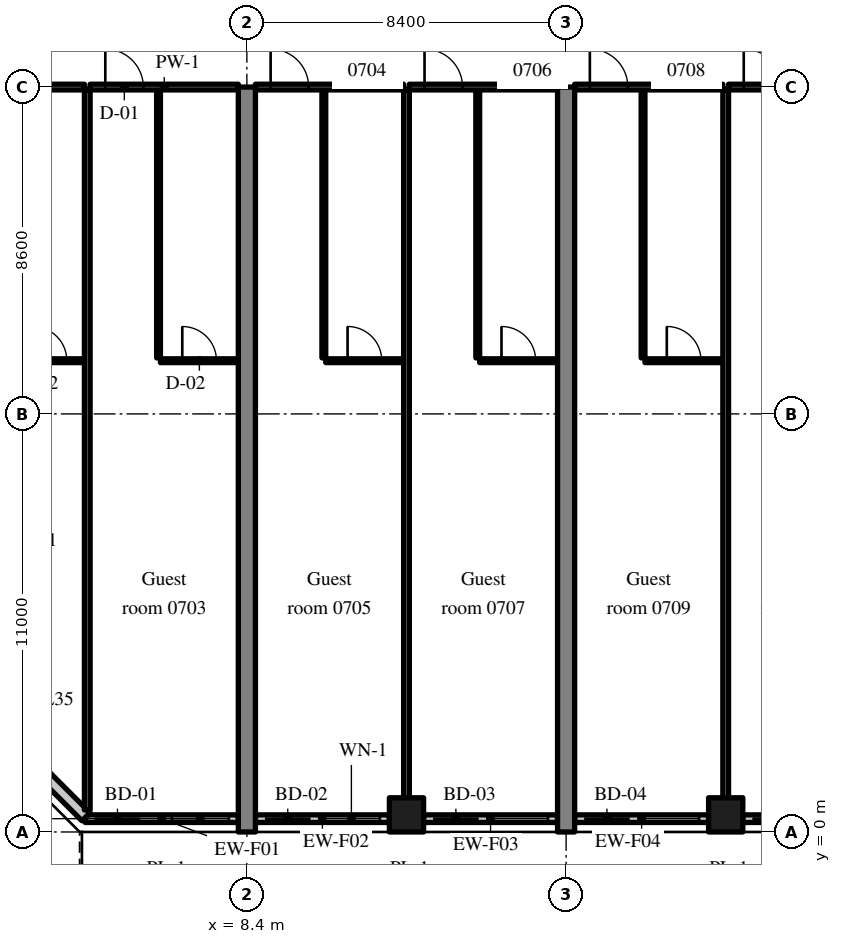
"""IFC4 building model, lengths in metres.
Left out: names, types, materials, properties, quantities, classifications, styles, units other than length and angle.
Written with IfcOpenShell. Run it as: python <this file> out.ifc"""

import sys

from ifc_helpers import new_model, si_unit, direction, frame, frame_2d, origin, origin_2d, place, context, subcontext, project, spatial, rectangle, extrude, source, transform, mapped, element, fill, save


model = new_model("IFC4")
c1 = context("Model", 3, precision=1e-05, world=origin(), true_north=direction((0.0, 1.0)))
c2 = subcontext(c1, "Body", "Model", "MODEL_VIEW")
j1 = project(units=[si_unit("LENGTHUNIT", "METRE"), si_unit("PLANEANGLEUNIT", "RADIAN")], contexts=[c1])
p1 = place(None, origin())
s1 = spatial("IfcSite", under=j1, at=p1, CompositionType="ELEMENT")
p2 = place(p1, origin())
s2 = spatial("IfcBuilding", under=s1, at=p2, CompositionType="ELEMENT")
p3 = place(p2, frame((0.0, 0.0, 35.4)))
s3 = spatial("IfcBuildingStorey", under=s2, at=p3, CompositionType="ELEMENT", Elevation=35.4)
m1 = source(origin(), c2, "Body", "SweptSolid", [
    extrude(rectangle(XDim=19.6, YDim=0.45, at=frame_2d((9.8, 0.0))), origin(), (0.0, 0.0, 1.0), 3.52),
])
for number, where, z_axis, x_axis in (
    (1, (8.4, 0.0, 0.0), (0.0, 0.0, 1.0), (0.0, 1.0, 0.0)),
    (2, (16.8, 0.0, 0.0), (0.0, 0.0, 1.0), (0.0, 1.0, 0.0)),
):
    element("IfcWall", number, at=place(p3, frame(where, z_axis=z_axis, x_axis=x_axis)), inside=s3, PredefinedType="SHEAR", context=c2, shape_type="MappedRepresentation", body=[
        mapped(m1, transform((0.0, 0.0, 0.0), scale=1.0)),
    ])
m2 = source(origin(), c2, "Body", "SweptSolid", [
    extrude(rectangle(XDim=0.9, YDim=0.9, at=origin_2d()), origin(), (0.0, 0.0, 1.0), 3.52),
])
for number, where, z_axis, x_axis in (
    (3, (12.6, 0.45, 0.0), (0.0, 0.0, 1.0), (1.0, 0.0, 0.0)),
    (4, (21.0, 0.45, 0.0), (0.0, 0.0, 1.0), (1.0, 0.0, 0.0)),
):
    element("IfcColumn", number, at=place(p3, frame(where, z_axis=z_axis, x_axis=x_axis)), inside=s3, PredefinedType="COLUMN", context=c2, shape_type="MappedRepresentation", body=[
        mapped(m2, transform((0.0, 0.0, 0.0), scale=1.0)),
    ])
m3 = source(origin(), c2, "Body", "SweptSolid", [
    extrude(rectangle(XDim=4.03, YDim=0.2, at=frame_2d((2.015, 0.0))), origin(), (0.0, 0.0, 1.0), 2.77),
])
p4 = place(p3, frame((4.145, 0.35, 0.0), z_axis=(0.0, 0.0, 1.0), x_axis=(1.0, 0.0, 0.0)))
e5 = element("IfcWall", 5, at=p4, inside=s3, PredefinedType="SOLIDWALL", context=c2, shape_type="MappedRepresentation", body=[
    mapped(m3, transform((0.0, 0.0, 0.0), scale=1.0)),
])
m4 = source(origin(), c2, "Body", "SweptSolid", [
    extrude(rectangle(XDim=1.2, YDim=2.4, at=frame_2d((0.6, 1.2))), frame((0.0, 0.11, 0.0), z_axis=(0.0, -1.0, 0.0), x_axis=(1.0, 0.0, 0.0)), (0.0, 0.0, 1.0), 0.22),
])
p5 = place(p4, frame((0.25, 0.0, 0.0)))
e6 = element("IfcOpeningElement", 6, at=p5, cuts=e5, PredefinedType="OPENING", context=c2, shape_type="MappedRepresentation", body=[
    mapped(m4, transform((0.0, 0.0, 0.0), scale=1.0)),
])
m5 = source(origin(), c2, "Body", "SweptSolid", [
    extrude(rectangle(XDim=1.5, YDim=1.5, at=frame_2d((0.75, 0.75))), frame((0.0, 0.11, 0.0), z_axis=(0.0, -1.0, 0.0), x_axis=(1.0, 0.0, 0.0)), (0.0, 0.0, 1.0), 0.22),
])
p6 = place(p4, frame((2.28, 0.0, 0.9)))
e7 = element("IfcOpeningElement", 7, at=p6, cuts=e5, PredefinedType="OPENING", context=c2, shape_type="MappedRepresentation", body=[
    mapped(m5, transform((0.0, 0.0, 0.0), scale=1.0)),
])
m6 = source(origin(), c2, "Body", "SweptSolid", [
    extrude(rectangle(XDim=3.525, YDim=0.2, at=frame_2d((1.762, 0.0))), origin(), (0.0, 0.0, 1.0), 2.77),
])
p7 = place(p3, frame((8.625, 0.35, 0.0), z_axis=(0.0, 0.0, 1.0), x_axis=(1.0, 0.0, 0.0)))
e8 = element("IfcWall", 8, at=p7, inside=s3, PredefinedType="SOLIDWALL", context=c2, shape_type="MappedRepresentation", body=[
    mapped(m6, transform((0.0, 0.0, 0.0), scale=1.0)),
])
p8 = place(p7, frame((0.25, 0.0, 0.0)))
e9 = element("IfcOpeningElement", 9, at=p8, cuts=e8, PredefinedType="OPENING", context=c2, shape_type="MappedRepresentation", body=[
    mapped(m4, transform((0.0, 0.0, 0.0), scale=1.0)),
])
p9 = place(p7, frame((1.775, 0.0, 0.9)))
e10 = element("IfcOpeningElement", 10, at=p9, cuts=e8, PredefinedType="OPENING", context=c2, shape_type="MappedRepresentation", body=[
    mapped(m5, transform((0.0, 0.0, 0.0), scale=1.0)),
])
p10 = place(p3, frame((13.05, 0.35, 0.0), z_axis=(0.0, 0.0, 1.0), x_axis=(1.0, 0.0, 0.0)))
e11 = element("IfcWall", 11, at=p10, inside=s3, PredefinedType="SOLIDWALL", context=c2, shape_type="MappedRepresentation", body=[
    mapped(m6, transform((0.0, 0.0, 0.0), scale=1.0)),
])
p11 = place(p10, frame((0.25, 0.0, 0.0)))
e12 = element("IfcOpeningElement", 12, at=p11, cuts=e11, PredefinedType="OPENING", context=c2, shape_type="MappedRepresentation", body=[
    mapped(m4, transform((0.0, 0.0, 0.0), scale=1.0)),
])
p12 = place(p10, frame((1.775, 0.0, 0.9)))
e13 = element("IfcOpeningElement", 13, at=p12, cuts=e11, PredefinedType="OPENING", context=c2, shape_type="MappedRepresentation", body=[
    mapped(m5, transform((0.0, 0.0, 0.0), scale=1.0)),
])
m7 = source(origin(), c2, "Body", "SweptSolid", [
    extrude(rectangle(XDim=3.525, YDim=0.2, at=frame_2d((1.763, 0.0))), origin(), (0.0, 0.0, 1.0), 2.77),
])
p13 = place(p3, frame((17.025, 0.35, 0.0), z_axis=(0.0, 0.0, 1.0), x_axis=(1.0, 0.0, 0.0)))
e14 = element("IfcWall", 14, at=p13, inside=s3, PredefinedType="SOLIDWALL", context=c2, shape_type="MappedRepresentation", body=[
    mapped(m7, transform((0.0, 0.0, 0.0), scale=1.0)),
])
p14 = place(p13, frame((0.25, 0.0, 0.0)))
e15 = element("IfcOpeningElement", 15, at=p14, cuts=e14, PredefinedType="OPENING", context=c2, shape_type="MappedRepresentation", body=[
    mapped(m4, transform((0.0, 0.0, 0.0), scale=1.0)),
])
p15 = place(p13, frame((1.775, 0.0, 0.9)))
e16 = element("IfcOpeningElement", 16, at=p15, cuts=e14, PredefinedType="OPENING", context=c2, shape_type="MappedRepresentation", body=[
    mapped(m5, transform((0.0, 0.0, 0.0), scale=1.0)),
])
p16 = place(p3, frame((21.45, 0.35, 0.0), z_axis=(0.0, 0.0, 1.0), x_axis=(1.0, 0.0, 0.0)))
e17 = element("IfcWall", 17, at=p16, inside=s3, PredefinedType="SOLIDWALL", context=c2, shape_type="MappedRepresentation", body=[
    mapped(m7, transform((0.0, 0.0, 0.0), scale=1.0)),
])
p17 = place(p16, frame((0.25, 0.0, 0.0)))
e18 = element("IfcOpeningElement", 18, at=p17, cuts=e17, PredefinedType="OPENING", context=c2, shape_type="MappedRepresentation", body=[
    mapped(m4, transform((0.0, 0.0, 0.0), scale=1.0)),
])
p18 = place(p16, frame((1.775, 0.0, 0.9)))
e19 = element("IfcOpeningElement", 19, at=p18, cuts=e17, PredefinedType="OPENING", context=c2, shape_type="MappedRepresentation", body=[
    mapped(m5, transform((0.0, 0.0, 0.0), scale=1.0)),
])
m8 = source(origin(), c2, "Body", "SweptSolid", [
    extrude(rectangle(XDim=5.326, YDim=0.3, at=frame_2d((2.663, 0.0))), origin(), (0.0, 0.0, 1.0), 3.52),
])
p19 = place(p3, frame((0.4, 4.166, 0.0), z_axis=(0.0, 0.0, 1.0), x_axis=(0.707106781187, -0.707106781187, 0.0)))
e20 = element("IfcWall", 20, at=p19, inside=s3, PredefinedType="SOLIDWALL", context=c2, shape_type="MappedRepresentation", body=[
    mapped(m8, transform((0.0, 0.0, 0.0), scale=1.0)),
])
m9 = source(origin(), c2, "Body", "SweptSolid", [
    extrude(rectangle(XDim=1.8, YDim=1.5, at=frame_2d((0.9, 0.75))), frame((0.0, 0.16, 0.0), z_axis=(0.0, -1.0, 0.0), x_axis=(1.0, 0.0, 0.0)), (0.0, 0.0, 1.0), 0.32),
])
p20 = place(p19, frame((1.889, 0.0, 0.9)))
e21 = element("IfcOpeningElement", 21, at=p20, cuts=e20, PredefinedType="OPENING", context=c2, shape_type="MappedRepresentation", body=[
    mapped(m9, transform((0.0, 0.0, 0.0), scale=1.0)),
])
m10 = source(origin(), c2, "Body", "SweptSolid", [
    extrude(rectangle(XDim=1.825, YDim=0.1, at=frame_2d((0.913, 0.0))), origin(), (0.0, 0.0, 1.0), 3.52),
])
p21 = place(p3, frame((2.3, 12.4, 0.0), z_axis=(0.0, 0.0, 1.0), x_axis=(1.0, 0.0, 0.0)))
e22 = element("IfcWall", 22, at=p21, inside=s3, PredefinedType="PARTITIONING", context=c2, shape_type="MappedRepresentation", body=[
    mapped(m10, transform((0.0, 0.0, 0.0), scale=1.0)),
])
m11 = source(origin(), c2, "Body", "SweptSolid", [
    extrude(rectangle(XDim=0.9, YDim=2.1, at=frame_2d((0.45, 1.05))), frame((0.0, 0.06, 0.0), z_axis=(0.0, -1.0, 0.0), x_axis=(1.0, 0.0, 0.0)), (0.0, 0.0, 1.0), 0.12),
])
p22 = place(p21, frame((0.462, 0.0, 0.0)))
e23 = element("IfcOpeningElement", 23, at=p22, cuts=e22, PredefinedType="OPENING", context=c2, shape_type="MappedRepresentation", body=[
    mapped(m11, transform((0.0, 0.0, 0.0), scale=1.0)),
])
m12 = source(origin(), c2, "Body", "SweptSolid", [
    extrude(rectangle(XDim=3.675, YDim=0.15, at=frame_2d((1.837, 0.0))), origin(), (0.0, 0.0, 1.0), 2.82),
])
p23 = place(p3, frame((0.45, 19.6, 0.0), z_axis=(0.0, 0.0, 1.0), x_axis=(1.0, 0.0, 0.0)))
e24 = element("IfcWall", 24, at=p23, inside=s3, PredefinedType="PARTITIONING", context=c2, shape_type="MappedRepresentation", body=[
    mapped(m12, transform((0.0, 0.0, 0.0), scale=1.0)),
])
m13 = source(origin(), c2, "Body", "SweptSolid", [
    extrude(rectangle(XDim=1.0, YDim=2.1, at=frame_2d((0.5, 1.05))), frame((0.0, 0.085, 0.0), z_axis=(0.0, -1.0, 0.0), x_axis=(1.0, 0.0, 0.0)), (0.0, 0.0, 1.0), 0.17),
])
p24 = place(p23, frame((0.4, 0.0, 0.0)))
e25 = element("IfcOpeningElement", 25, at=p24, cuts=e24, PredefinedType="OPENING", context=c2, shape_type="MappedRepresentation", body=[
    mapped(m13, transform((0.0, 0.0, 0.0), scale=1.0)),
])
m14 = source(origin(), c2, "Body", "SweptSolid", [
    extrude(rectangle(XDim=7.05, YDim=0.1, at=frame_2d((3.525, 0.0))), origin(), (0.0, 0.0, 1.0), 3.52),
])
p25 = place(p3, frame((6.075, 12.475, 0.0), z_axis=(0.0, 0.0, 1.0), x_axis=(0.0, 1.0, 0.0)))
e26 = element("IfcWall", 26, at=p25, inside=s3, PredefinedType="PARTITIONING", context=c2, shape_type="MappedRepresentation", body=[
    mapped(m14, transform((0.0, 0.0, 0.0), scale=1.0)),
])
m15 = source(origin(), c2, "Body", "SweptSolid", [
    extrude(rectangle(XDim=2.05, YDim=0.1, at=frame_2d((1.025, 0.0))), origin(), (0.0, 0.0, 1.0), 3.52),
])
p26 = place(p3, frame((6.125, 12.4, 0.0), z_axis=(0.0, 0.0, 1.0), x_axis=(1.0, 0.0, 0.0)))
e27 = element("IfcWall", 27, at=p26, inside=s3, PredefinedType="PARTITIONING", context=c2, shape_type="MappedRepresentation", body=[
    mapped(m15, transform((0.0, 0.0, 0.0), scale=1.0)),
])
p27 = place(p26, frame((0.575, 0.0, 0.0)))
e28 = element("IfcOpeningElement", 28, at=p27, cuts=e27, PredefinedType="OPENING", context=c2, shape_type="MappedRepresentation", body=[
    mapped(m11, transform((0.0, 0.0, 0.0), scale=1.0)),
])
m16 = source(origin(), c2, "Body", "SweptSolid", [
    extrude(rectangle(XDim=3.9, YDim=0.15, at=frame_2d((1.95, 0.0))), origin(), (0.0, 0.0, 1.0), 2.82),
])
p28 = place(p3, frame((4.275, 19.6, 0.0), z_axis=(0.0, 0.0, 1.0), x_axis=(1.0, 0.0, 0.0)))
e29 = element("IfcWall", 29, at=p28, inside=s3, PredefinedType="PARTITIONING", context=c2, shape_type="MappedRepresentation", body=[
    mapped(m16, transform((0.0, 0.0, 0.0), scale=1.0)),
])
p29 = place(p28, frame((0.4, 0.0, 0.0)))
e30 = element("IfcOpeningElement", 30, at=p29, cuts=e29, PredefinedType="OPENING", context=c2, shape_type="MappedRepresentation", body=[
    mapped(m13, transform((0.0, 0.0, 0.0), scale=1.0)),
])
m17 = source(origin(), c2, "Body", "SweptSolid", [
    extrude(rectangle(XDim=18.947, YDim=0.15, at=frame_2d((9.474, 0.0))), origin(), (0.0, 0.0, 1.0), 3.52),
])
p30 = place(p3, frame((4.2, 0.578, 0.0), z_axis=(0.0, 0.0, 1.0), x_axis=(0.0, 1.0, 0.0)))
e31 = element("IfcWall", 31, at=p30, inside=s3, PredefinedType="PARTITIONING", context=c2, shape_type="MappedRepresentation", body=[
    mapped(m17, transform((0.0, 0.0, 0.0), scale=1.0)),
])
p31 = place(p3, frame((10.425, 12.475, 0.0), z_axis=(0.0, 0.0, 1.0), x_axis=(0.0, 1.0, 0.0)))
e32 = element("IfcWall", 32, at=p31, inside=s3, PredefinedType="PARTITIONING", context=c2, shape_type="MappedRepresentation", body=[
    mapped(m14, transform((0.0, 0.0, 0.0), scale=1.0)),
])
m18 = source(origin(), c2, "Body", "SweptSolid", [
    extrude(rectangle(XDim=2.05, YDim=0.1, at=frame_2d((1.025, 0.0))), origin(), (0.0, 0.0, 1.0), 3.52),
])
p32 = place(p3, frame((10.475, 12.4, 0.0), z_axis=(0.0, 0.0, 1.0), x_axis=(1.0, 0.0, 0.0)))
e33 = element("IfcWall", 33, at=p32, inside=s3, PredefinedType="PARTITIONING", context=c2, shape_type="MappedRepresentation", body=[
    mapped(m18, transform((0.0, 0.0, 0.0), scale=1.0)),
])
p33 = place(p32, frame((0.575, 0.0, 0.0)))
e34 = element("IfcOpeningElement", 34, at=p33, cuts=e33, PredefinedType="OPENING", context=c2, shape_type="MappedRepresentation", body=[
    mapped(m11, transform((0.0, 0.0, 0.0), scale=1.0)),
])
m19 = source(origin(), c2, "Body", "SweptSolid", [
    extrude(rectangle(XDim=3.9, YDim=0.15, at=frame_2d((1.95, 0.0))), origin(), (0.0, 0.0, 1.0), 2.82),
])
p34 = place(p3, frame((8.625, 19.6, 0.0), z_axis=(0.0, 0.0, 1.0), x_axis=(1.0, 0.0, 0.0)))
e35 = element("IfcWall", 35, at=p34, inside=s3, PredefinedType="PARTITIONING", context=c2, shape_type="MappedRepresentation", body=[
    mapped(m19, transform((0.0, 0.0, 0.0), scale=1.0)),
])
p35 = place(p34, frame((0.4, 0.0, 0.0)))
e36 = element("IfcOpeningElement", 36, at=p35, cuts=e35, PredefinedType="OPENING", context=c2, shape_type="MappedRepresentation", body=[
    mapped(m13, transform((0.0, 0.0, 0.0), scale=1.0)),
])
p36 = place(p3, frame((14.475, 12.475, 0.0), z_axis=(0.0, 0.0, 1.0), x_axis=(0.0, 1.0, 0.0)))
e37 = element("IfcWall", 37, at=p36, inside=s3, PredefinedType="PARTITIONING", context=c2, shape_type="MappedRepresentation", body=[
    mapped(m14, transform((0.0, 0.0, 0.0), scale=1.0)),
])
p37 = place(p3, frame((14.525, 12.4, 0.0), z_axis=(0.0, 0.0, 1.0), x_axis=(1.0, 0.0, 0.0)))
e38 = element("IfcWall", 38, at=p37, inside=s3, PredefinedType="PARTITIONING", context=c2, shape_type="MappedRepresentation", body=[
    mapped(m15, transform((0.0, 0.0, 0.0), scale=1.0)),
])
p38 = place(p37, frame((0.575, 0.0, 0.0)))
e39 = element("IfcOpeningElement", 39, at=p38, cuts=e38, PredefinedType="OPENING", context=c2, shape_type="MappedRepresentation", body=[
    mapped(m11, transform((0.0, 0.0, 0.0), scale=1.0)),
])
p39 = place(p3, frame((12.675, 19.6, 0.0), z_axis=(0.0, 0.0, 1.0), x_axis=(1.0, 0.0, 0.0)))
e40 = element("IfcWall", 40, at=p39, inside=s3, PredefinedType="PARTITIONING", context=c2, shape_type="MappedRepresentation", body=[
    mapped(m19, transform((0.0, 0.0, 0.0), scale=1.0)),
])
p40 = place(p39, frame((0.4, 0.0, 0.0)))
e41 = element("IfcOpeningElement", 41, at=p40, cuts=e40, PredefinedType="OPENING", context=c2, shape_type="MappedRepresentation", body=[
    mapped(m13, transform((0.0, 0.0, 0.0), scale=1.0)),
])
m20 = source(origin(), c2, "Body", "SweptSolid", [
    extrude(rectangle(XDim=18.625, YDim=0.15, at=frame_2d((9.312, 0.0))), origin(), (0.0, 0.0, 1.0), 3.52),
])
p41 = place(p3, frame((12.6, 0.9, 0.0), z_axis=(0.0, 0.0, 1.0), x_axis=(0.0, 1.0, 0.0)))
e42 = element("IfcWall", 42, at=p41, inside=s3, PredefinedType="PARTITIONING", context=c2, shape_type="MappedRepresentation", body=[
    mapped(m20, transform((0.0, 0.0, 0.0), scale=1.0)),
])
p42 = place(p3, frame((18.825, 12.475, 0.0), z_axis=(0.0, 0.0, 1.0), x_axis=(0.0, 1.0, 0.0)))
e43 = element("IfcWall", 43, at=p42, inside=s3, PredefinedType="PARTITIONING", context=c2, shape_type="MappedRepresentation", body=[
    mapped(m14, transform((0.0, 0.0, 0.0), scale=1.0)),
])
p43 = place(p3, frame((18.875, 12.4, 0.0), z_axis=(0.0, 0.0, 1.0), x_axis=(1.0, 0.0, 0.0)))
e44 = element("IfcWall", 44, at=p43, inside=s3, PredefinedType="PARTITIONING", context=c2, shape_type="MappedRepresentation", body=[
    mapped(m15, transform((0.0, 0.0, 0.0), scale=1.0)),
])
p44 = place(p43, frame((0.575, 0.0, 0.0)))
e45 = element("IfcOpeningElement", 45, at=p44, cuts=e44, PredefinedType="OPENING", context=c2, shape_type="MappedRepresentation", body=[
    mapped(m11, transform((0.0, 0.0, 0.0), scale=1.0)),
])
p45 = place(p3, frame((17.025, 19.6, 0.0), z_axis=(0.0, 0.0, 1.0), x_axis=(1.0, 0.0, 0.0)))
e46 = element("IfcWall", 46, at=p45, inside=s3, PredefinedType="PARTITIONING", context=c2, shape_type="MappedRepresentation", body=[
    mapped(m16, transform((0.0, 0.0, 0.0), scale=1.0)),
])
p46 = place(p45, frame((0.4, 0.0, 0.0)))
e47 = element("IfcOpeningElement", 47, at=p46, cuts=e46, PredefinedType="OPENING", context=c2, shape_type="MappedRepresentation", body=[
    mapped(m13, transform((0.0, 0.0, 0.0), scale=1.0)),
])
p47 = place(p3, frame((21.075, 19.6, 0.0), z_axis=(0.0, 0.0, 1.0), x_axis=(1.0, 0.0, 0.0)))
e48 = element("IfcWall", 48, at=p47, inside=s3, PredefinedType="PARTITIONING", context=c2, shape_type="MappedRepresentation", body=[
    mapped(m16, transform((0.0, 0.0, 0.0), scale=1.0)),
])
p48 = place(p47, frame((0.4, 0.0, 0.0)))
e49 = element("IfcOpeningElement", 49, at=p48, cuts=e48, PredefinedType="OPENING", context=c2, shape_type="MappedRepresentation", body=[
    mapped(m13, transform((0.0, 0.0, 0.0), scale=1.0)),
])
p49 = place(p3, frame((21.0, 0.9, 0.0), z_axis=(0.0, 0.0, 1.0), x_axis=(0.0, 1.0, 0.0)))
e50 = element("IfcWall", 50, at=p49, inside=s3, PredefinedType="PARTITIONING", context=c2, shape_type="MappedRepresentation", body=[
    mapped(m20, transform((0.0, 0.0, 0.0), scale=1.0)),
])
m21 = source(origin(), c2, "Body", "SweptSolid", [
    extrude(rectangle(XDim=1.2, YDim=2.4, at=frame_2d((0.6, 1.2))), frame((0.0, 0.025, 0.0), z_axis=(0.0, -1.0, 0.0), x_axis=(1.0, 0.0, 0.0)), (0.0, 0.0, 1.0), 0.05),
])
p50 = place(p5, origin())
e51 = element("IfcDoor", 51, at=p50, inside=s3, OperationType="SLIDING_TO_LEFT", PredefinedType="DOOR", context=c2, shape_type="MappedRepresentation", body=[
    mapped(m21, transform((0.0, 0.0, 0.0), scale=1.0)),
])
fill(e6, e51)
m22 = source(origin(), c2, "Body", "SweptSolid", [
    extrude(rectangle(XDim=1.5, YDim=1.5, at=frame_2d((0.75, 0.75))), frame((0.0, 0.03, 0.0), z_axis=(0.0, -1.0, 0.0), x_axis=(1.0, 0.0, 0.0)), (0.0, 0.0, 1.0), 0.06),
])
p51 = place(p6, origin())
e52 = element("IfcWindow", 52, at=p51, inside=s3, PartitioningType="SINGLE_PANEL", PredefinedType="WINDOW", context=c2, shape_type="MappedRepresentation", body=[
    mapped(m22, transform((0.0, 0.0, 0.0), scale=1.0)),
])
fill(e7, e52)
p52 = place(p8, origin())
e53 = element("IfcDoor", 53, at=p52, inside=s3, OperationType="SLIDING_TO_RIGHT", PredefinedType="DOOR", context=c2, shape_type="MappedRepresentation", body=[
    mapped(m21, transform((0.0, 0.0, 0.0), scale=1.0)),
])
fill(e9, e53)
p53 = place(p9, origin())
e54 = element("IfcWindow", 54, at=p53, inside=s3, PartitioningType="SINGLE_PANEL", PredefinedType="WINDOW", context=c2, shape_type="MappedRepresentation", body=[
    mapped(m22, transform((0.0, 0.0, 0.0), scale=1.0)),
])
fill(e10, e54)
p54 = place(p11, origin())
e55 = element("IfcDoor", 55, at=p54, inside=s3, OperationType="SLIDING_TO_LEFT", PredefinedType="DOOR", context=c2, shape_type="MappedRepresentation", body=[
    mapped(m21, transform((0.0, 0.0, 0.0), scale=1.0)),
])
fill(e12, e55)
p55 = place(p12, origin())
e56 = element("IfcWindow", 56, at=p55, inside=s3, PartitioningType="SINGLE_PANEL", PredefinedType="WINDOW", context=c2, shape_type="MappedRepresentation", body=[
    mapped(m22, transform((0.0, 0.0, 0.0), scale=1.0)),
])
fill(e13, e56)
p56 = place(p14, origin())
e57 = element("IfcDoor", 57, at=p56, inside=s3, OperationType="SLIDING_TO_RIGHT", PredefinedType="DOOR", context=c2, shape_type="MappedRepresentation", body=[
    mapped(m21, transform((0.0, 0.0, 0.0), scale=1.0)),
])
fill(e15, e57)
p57 = place(p15, origin())
e58 = element("IfcWindow", 58, at=p57, inside=s3, PartitioningType="SINGLE_PANEL", PredefinedType="WINDOW", context=c2, shape_type="MappedRepresentation", body=[
    mapped(m22, transform((0.0, 0.0, 0.0), scale=1.0)),
])
fill(e16, e58)
p58 = place(p17, origin())
e59 = element("IfcDoor", 59, at=p58, inside=s3, OperationType="SLIDING_TO_LEFT", PredefinedType="DOOR", context=c2, shape_type="MappedRepresentation", body=[
    mapped(m21, transform((0.0, 0.0, 0.0), scale=1.0)),
])
fill(e18, e59)
m23 = source(origin(), c2, "Body", "SweptSolid", [
    extrude(rectangle(XDim=0.9, YDim=2.1, at=frame_2d((0.45, 1.05))), frame((0.0, 0.025, 0.0), z_axis=(0.0, -1.0, 0.0), x_axis=(1.0, 0.0, 0.0)), (0.0, 0.0, 1.0), 0.05),
])
p59 = place(p22, origin())
e60 = element("IfcDoor", 60, at=p59, inside=s3, OperationType="SINGLE_SWING_LEFT", PredefinedType="DOOR", context=c2, shape_type="MappedRepresentation", body=[
    mapped(m23, transform((0.0, 0.0, 0.0), scale=1.0)),
])
fill(e23, e60)
p60 = place(p27, origin())
e61 = element("IfcDoor", 61, at=p60, inside=s3, OperationType="SINGLE_SWING_LEFT", PredefinedType="DOOR", context=c2, shape_type="MappedRepresentation", body=[
    mapped(m23, transform((0.0, 0.0, 0.0), scale=1.0)),
])
fill(e28, e61)
m24 = source(origin(), c2, "Body", "SweptSolid", [
    extrude(rectangle(XDim=1.0, YDim=2.1, at=frame_2d((0.5, 1.05))), frame((0.0, 0.025, 0.0), z_axis=(0.0, -1.0, 0.0), x_axis=(1.0, 0.0, 0.0)), (0.0, 0.0, 1.0), 0.05),
])
p61 = place(p29, origin())
e62 = element("IfcDoor", 62, at=p61, inside=s3, OperationType="SINGLE_SWING_LEFT", PredefinedType="DOOR", context=c2, shape_type="MappedRepresentation", body=[
    mapped(m24, transform((0.0, 0.0, 0.0), scale=1.0)),
])
fill(e30, e62)
p62 = place(p33, origin())
e63 = element("IfcDoor", 63, at=p62, inside=s3, OperationType="SINGLE_SWING_LEFT", PredefinedType="DOOR", context=c2, shape_type="MappedRepresentation", body=[
    mapped(m23, transform((0.0, 0.0, 0.0), scale=1.0)),
])
fill(e34, e63)
p63 = place(p35, origin())
e64 = element("IfcDoor", 64, at=p63, inside=s3, OperationType="SINGLE_SWING_LEFT", PredefinedType="DOOR", context=c2, shape_type="MappedRepresentation", body=[
    mapped(m24, transform((0.0, 0.0, 0.0), scale=1.0)),
])
fill(e36, e64)
p64 = place(p38, origin())
e65 = element("IfcDoor", 65, at=p64, inside=s3, OperationType="SINGLE_SWING_LEFT", PredefinedType="DOOR", context=c2, shape_type="MappedRepresentation", body=[
    mapped(m23, transform((0.0, 0.0, 0.0), scale=1.0)),
])
fill(e39, e65)
p65 = place(p40, origin())
e66 = element("IfcDoor", 66, at=p65, inside=s3, OperationType="SINGLE_SWING_LEFT", PredefinedType="DOOR", context=c2, shape_type="MappedRepresentation", body=[
    mapped(m24, transform((0.0, 0.0, 0.0), scale=1.0)),
])
fill(e41, e66)
p66 = place(p44, origin())
e67 = element("IfcDoor", 67, at=p66, inside=s3, OperationType="SINGLE_SWING_LEFT", PredefinedType="DOOR", context=c2, shape_type="MappedRepresentation", body=[
    mapped(m23, transform((0.0, 0.0, 0.0), scale=1.0)),
])
fill(e45, e67)
p67 = place(p46, origin())
e68 = element("IfcDoor", 68, at=p67, inside=s3, OperationType="SINGLE_SWING_LEFT", PredefinedType="DOOR", context=c2, shape_type="MappedRepresentation", body=[
    mapped(m24, transform((0.0, 0.0, 0.0), scale=1.0)),
])
fill(e47, e68)
p68 = place(p48, origin())
e69 = element("IfcDoor", 69, at=p68, inside=s3, OperationType="SINGLE_SWING_LEFT", PredefinedType="DOOR", context=c2, shape_type="MappedRepresentation", body=[
    mapped(m24, transform((0.0, 0.0, 0.0), scale=1.0)),
])
fill(e49, e69)
save(model, sys.argv[1])
